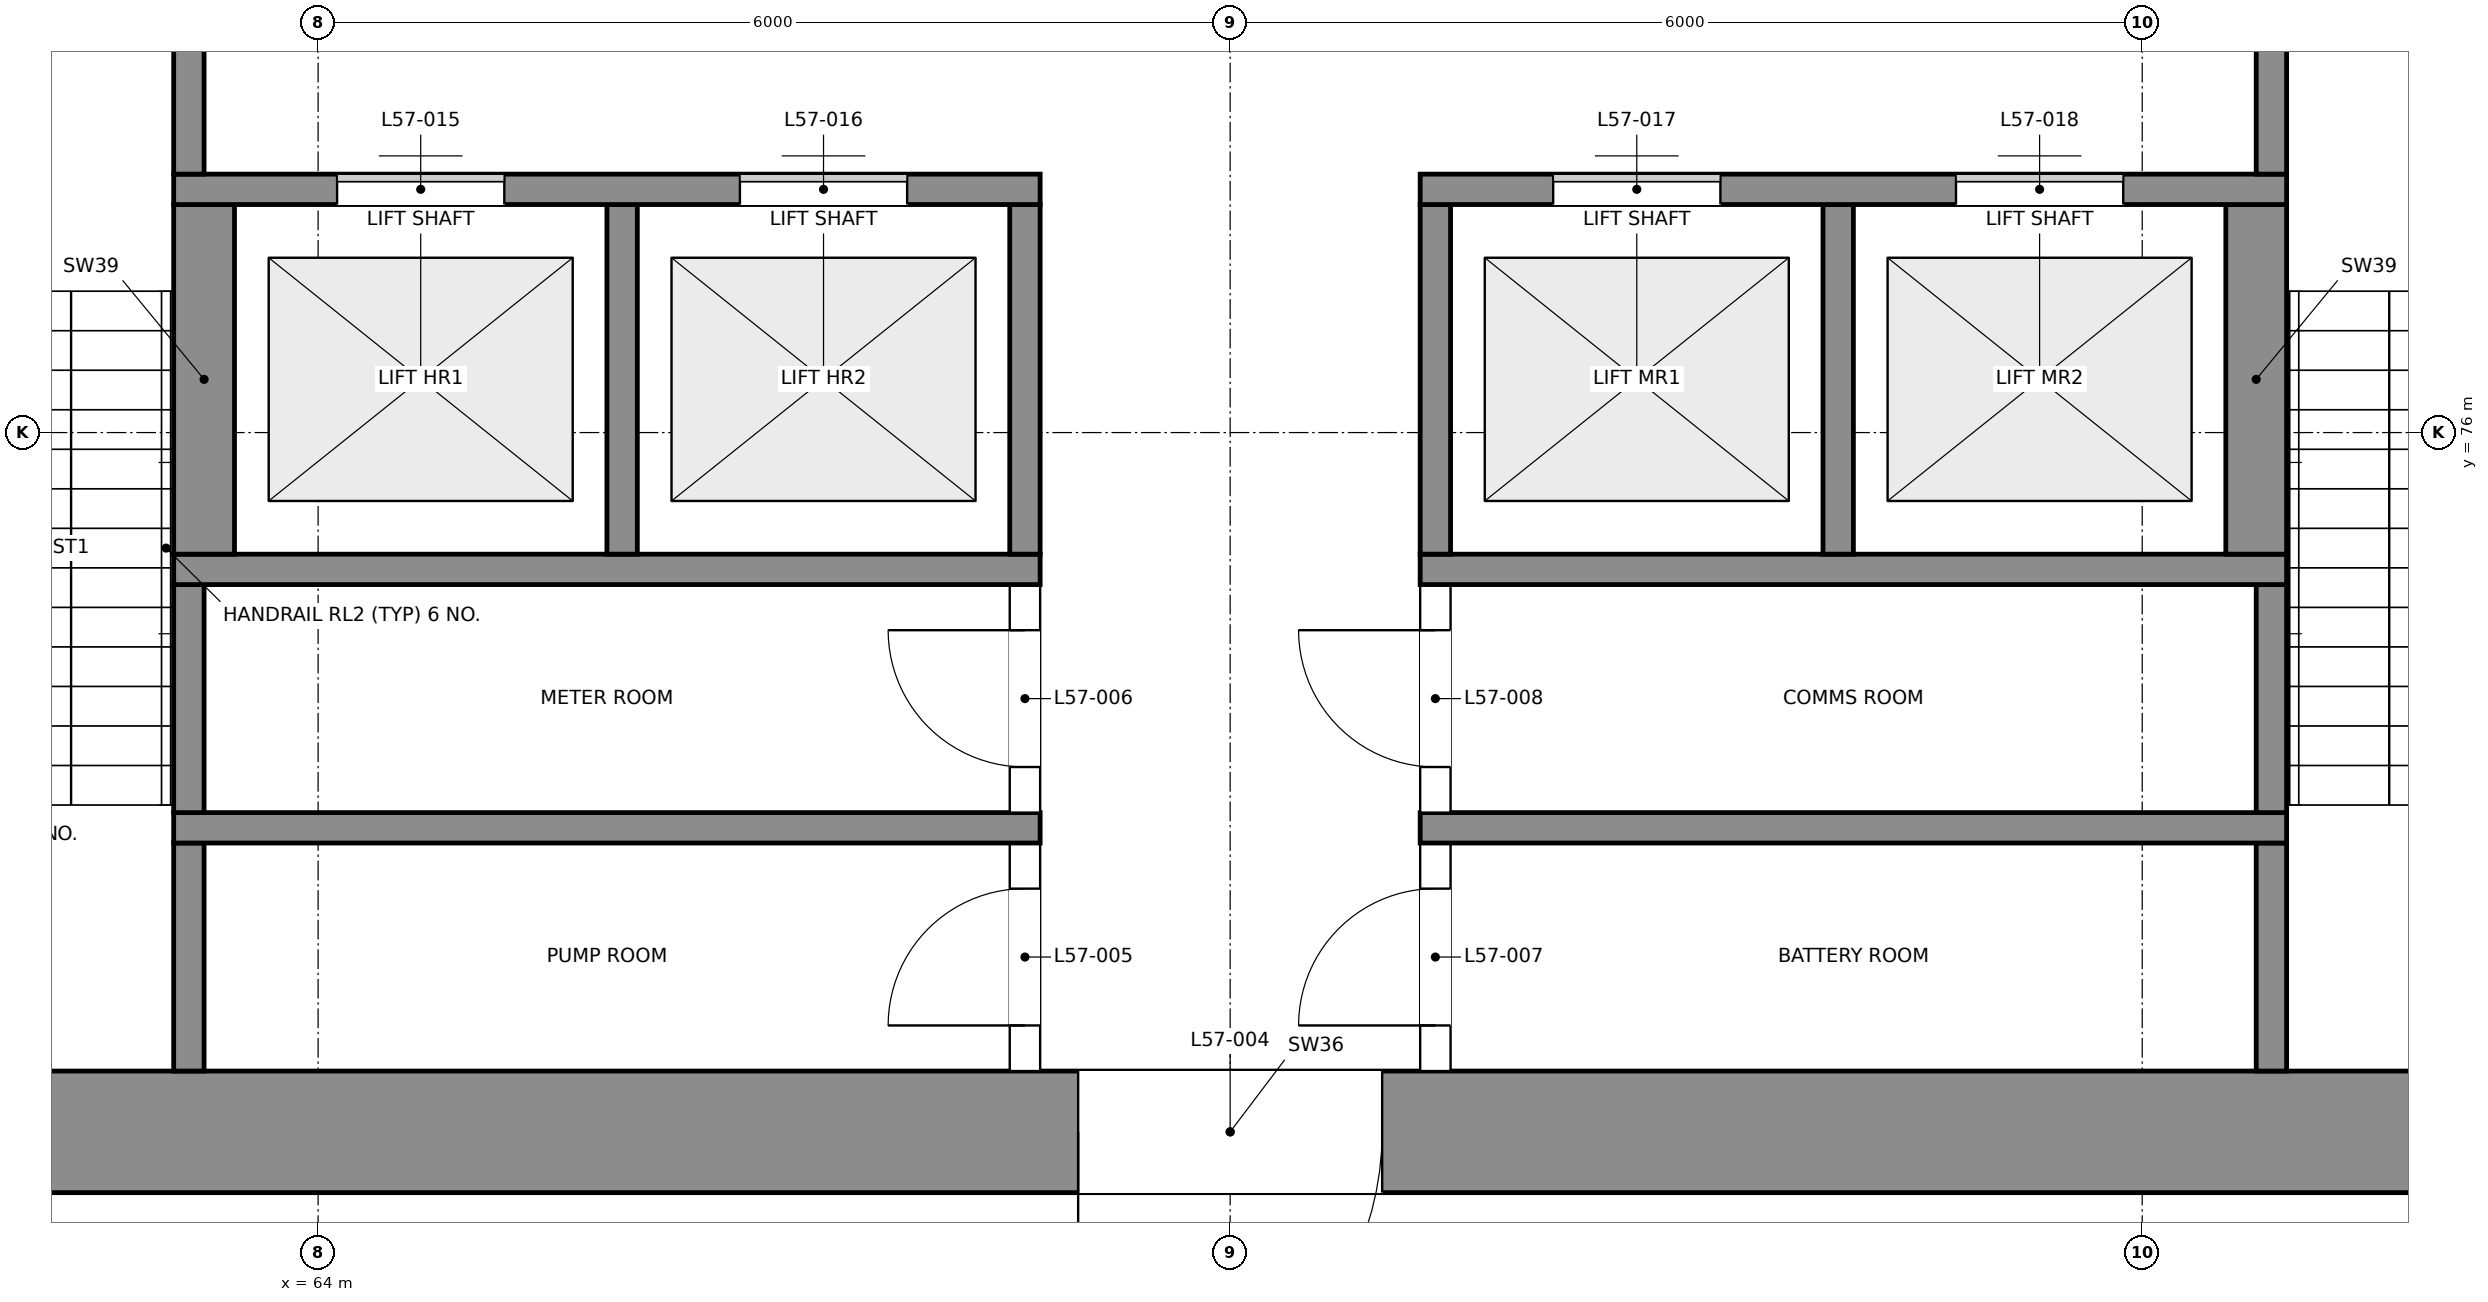
"""IFC4 building model, lengths in metres.
Left out: names, types, materials, properties, quantities, classifications, styles, units other than length and angle.
Written with IfcOpenShell. Run it as: python <this file> out.ifc"""

import sys

from ifc_helpers import new_model, si_unit, direction, frame, frame_2d, origin, place, context, subcontext, project, spatial, rectangle, extrude, element, fill, save


model = new_model("IFC4")
c1 = context("Model", 3, precision=1e-05, world=origin(), true_north=direction((0.0, 1.0)))
c2 = subcontext(c1, "Body", "Model", "MODEL_VIEW")
j1 = project(units=[si_unit("LENGTHUNIT", "METRE"), si_unit("PLANEANGLEUNIT", "RADIAN")], contexts=[c1])
p1 = place(None, origin())
s1 = spatial("IfcSite", under=j1, at=p1, CompositionType="ELEMENT")
p2 = place(p1, origin())
s2 = spatial("IfcBuilding", under=s1, at=p2, CompositionType="ELEMENT")
p3 = place(p2, frame((0.0, 0.0, 243.3)))
s3 = spatial("IfcBuildingStorey", under=s2, at=p3, CompositionType="ELEMENT", Elevation=243.3)
p4 = place(p3, frame((59.0, 71.4, 0.0), z_axis=(0.0, 0.0, 1.0), x_axis=(1.0, 0.0, 0.0)))
e1 = element("IfcWall", 1, at=p4, inside=s3, PredefinedType="SHEAR", context=c2, shape_type="SweptSolid", body=[
    extrude(rectangle(XDim=22.0, YDim=0.8, at=frame_2d((11.0, 0.0))), origin(), (0.0, 0.0, 1.0), 5.0),
])
p5 = place(p4, frame((2.025, 0.0, 0.0)))
e2 = element("IfcOpeningElement", 2, at=p5, cuts=e1, PredefinedType="OPENING", context=c2, shape_type="SweptSolid", body=[
    extrude(rectangle(XDim=1.2, YDim=2.1, at=frame_2d((0.6, 1.05))), frame((0.0, 0.41, 0.0), z_axis=(0.0, -1.0, 0.0), x_axis=(1.0, 0.0, 0.0)), (0.0, 0.0, 1.0), 0.82),
])
p6 = place(p4, frame((18.775, 0.0, 0.0)))
e3 = element("IfcOpeningElement", 3, at=p6, cuts=e1, PredefinedType="OPENING", context=c2, shape_type="SweptSolid", body=[
    extrude(rectangle(XDim=1.2, YDim=2.1, at=frame_2d((0.6, 1.05))), frame((0.0, 0.41, 0.0), z_axis=(0.0, -1.0, 0.0), x_axis=(1.0, 0.0, 0.0)), (0.0, 0.0, 1.0), 0.82),
])
p7 = place(p4, frame((10.0, 0.0, 0.0)))
e4 = element("IfcOpeningElement", 4, at=p7, cuts=e1, PredefinedType="OPENING", context=c2, shape_type="SweptSolid", body=[
    extrude(rectangle(XDim=2.0, YDim=2.1, at=frame_2d((1.0, 1.05))), frame((0.0, 0.41, 0.0), z_axis=(0.0, -1.0, 0.0), x_axis=(1.0, 0.0, 0.0)), (0.0, 0.0, 1.0), 0.82),
])
p8 = place(p3, frame((63.15, 71.8, 0.0), z_axis=(0.0, 0.0, 1.0), x_axis=(0.0, 1.0, 0.0)))
e5 = element("IfcWall", 5, at=p8, inside=s3, PredefinedType="SHEAR", context=c2, shape_type="SweptSolid", body=[
    extrude(rectangle(XDim=1.5, YDim=0.2, at=frame_2d((0.75, 0.0))), origin(), (0.0, 0.0, 1.0), 5.0),
])
p9 = place(p3, frame((68.65, 71.8, 0.0), z_axis=(0.0, 0.0, 1.0), x_axis=(0.0, 1.0, 0.0)))
e6 = element("IfcWall", 6, at=p9, inside=s3, PredefinedType="PARTITIONING", context=c2, shape_type="SweptSolid", body=[
    extrude(rectangle(XDim=1.5, YDim=0.2, at=frame_2d((0.75, 0.0))), origin(), (0.0, 0.0, 1.0), 4.7),
])
p10 = place(p9, frame((0.3, 0.0, 0.0)))
e7 = element("IfcOpeningElement", 7, at=p10, cuts=e6, PredefinedType="OPENING", context=c2, shape_type="SweptSolid", body=[
    extrude(rectangle(XDim=0.9, YDim=2.1, at=frame_2d((0.45, 1.05))), frame((0.0, 0.11, 0.0), z_axis=(0.0, -1.0, 0.0), x_axis=(1.0, 0.0, 0.0)), (0.0, 0.0, 1.0), 0.22),
])
p11 = place(p3, frame((71.35, 71.8, 0.0), z_axis=(0.0, 0.0, 1.0), x_axis=(0.0, 1.0, 0.0)))
e8 = element("IfcWall", 8, at=p11, inside=s3, PredefinedType="PARTITIONING", context=c2, shape_type="SweptSolid", body=[
    extrude(rectangle(XDim=1.5, YDim=0.2, at=frame_2d((0.75, 0.0))), origin(), (0.0, 0.0, 1.0), 4.7),
])
p12 = place(p11, frame((0.3, 0.0, 0.0)))
e9 = element("IfcOpeningElement", 9, at=p12, cuts=e8, PredefinedType="OPENING", context=c2, shape_type="SweptSolid", body=[
    extrude(rectangle(XDim=0.9, YDim=2.1, at=frame_2d((0.45, 1.05))), frame((0.0, 0.11, 0.0), z_axis=(0.0, -1.0, 0.0), x_axis=(1.0, 0.0, 0.0)), (0.0, 0.0, 1.0), 0.22),
])
p13 = place(p3, frame((76.85, 71.8, 0.0), z_axis=(0.0, 0.0, 1.0), x_axis=(0.0, 1.0, 0.0)))
e10 = element("IfcWall", 10, at=p13, inside=s3, PredefinedType="SHEAR", context=c2, shape_type="SweptSolid", body=[
    extrude(rectangle(XDim=1.5, YDim=0.2, at=frame_2d((0.75, 0.0))), origin(), (0.0, 0.0, 1.0), 5.0),
])
for number, where, z_axis, x_axis in (
    (11, (63.05, 73.4, 0.0), (0.0, 0.0, 1.0), (1.0, 0.0, 0.0)),
    (12, (71.25, 73.4, 0.0), (0.0, 0.0, 1.0), (1.0, 0.0, 0.0)),
):
    element("IfcWall", number, at=place(p3, frame(where, z_axis=z_axis, x_axis=x_axis)), inside=s3, PredefinedType="SHEAR", context=c2, shape_type="SweptSolid", body=[
        extrude(rectangle(XDim=5.7, YDim=0.2, at=frame_2d((2.85, 0.0))), origin(), (0.0, 0.0, 1.0), 5.0),
    ])
p14 = place(p3, frame((63.15, 73.5, 0.0), z_axis=(0.0, 0.0, 1.0), x_axis=(0.0, 1.0, 0.0)))
e13 = element("IfcWall", 13, at=p14, inside=s3, PredefinedType="SHEAR", context=c2, shape_type="SweptSolid", body=[
    extrude(rectangle(XDim=1.5, YDim=0.2, at=frame_2d((0.75, 0.0))), origin(), (0.0, 0.0, 1.0), 5.0),
])
p15 = place(p3, frame((68.65, 73.5, 0.0), z_axis=(0.0, 0.0, 1.0), x_axis=(0.0, 1.0, 0.0)))
e14 = element("IfcWall", 14, at=p15, inside=s3, PredefinedType="PARTITIONING", context=c2, shape_type="SweptSolid", body=[
    extrude(rectangle(XDim=1.5, YDim=0.2, at=frame_2d((0.75, 0.0))), origin(), (0.0, 0.0, 1.0), 4.7),
])
p16 = place(p15, frame((0.3, 0.0, 0.0)))
e15 = element("IfcOpeningElement", 15, at=p16, cuts=e14, PredefinedType="OPENING", context=c2, shape_type="SweptSolid", body=[
    extrude(rectangle(XDim=0.9, YDim=2.1, at=frame_2d((0.45, 1.05))), frame((0.0, 0.11, 0.0), z_axis=(0.0, -1.0, 0.0), x_axis=(1.0, 0.0, 0.0)), (0.0, 0.0, 1.0), 0.22),
])
p17 = place(p3, frame((71.35, 73.5, 0.0), z_axis=(0.0, 0.0, 1.0), x_axis=(0.0, 1.0, 0.0)))
e16 = element("IfcWall", 16, at=p17, inside=s3, PredefinedType="PARTITIONING", context=c2, shape_type="SweptSolid", body=[
    extrude(rectangle(XDim=1.5, YDim=0.2, at=frame_2d((0.75, 0.0))), origin(), (0.0, 0.0, 1.0), 4.7),
])
p18 = place(p17, frame((0.3, 0.0, 0.0)))
e17 = element("IfcOpeningElement", 17, at=p18, cuts=e16, PredefinedType="OPENING", context=c2, shape_type="SweptSolid", body=[
    extrude(rectangle(XDim=0.9, YDim=2.1, at=frame_2d((0.45, 1.05))), frame((0.0, 0.11, 0.0), z_axis=(0.0, -1.0, 0.0), x_axis=(1.0, 0.0, 0.0)), (0.0, 0.0, 1.0), 0.22),
])
p19 = place(p3, frame((76.85, 73.5, 0.0), z_axis=(0.0, 0.0, 1.0), x_axis=(0.0, 1.0, 0.0)))
e18 = element("IfcWall", 18, at=p19, inside=s3, PredefinedType="SHEAR", context=c2, shape_type="SweptSolid", body=[
    extrude(rectangle(XDim=1.5, YDim=0.2, at=frame_2d((0.75, 0.0))), origin(), (0.0, 0.0, 1.0), 5.0),
])
for number, where, z_axis, x_axis in (
    (19, (63.05, 75.1, 0.0), (0.0, 0.0, 1.0), (1.0, 0.0, 0.0)),
    (20, (71.25, 75.1, 0.0), (0.0, 0.0, 1.0), (1.0, 0.0, 0.0)),
):
    element("IfcWall", number, at=place(p3, frame(where, z_axis=z_axis, x_axis=x_axis)), inside=s3, PredefinedType="SHEAR", context=c2, shape_type="SweptSolid", body=[
        extrude(rectangle(XDim=5.7, YDim=0.2, at=frame_2d((2.85, 0.0))), origin(), (0.0, 0.0, 1.0), 5.0),
    ])
p20 = place(p3, frame((63.25, 75.2, 0.0), z_axis=(0.0, 0.0, 1.0), x_axis=(0.0, 1.0, 0.0)))
e21 = element("IfcWall", 21, at=p20, inside=s3, PredefinedType="SHEAR", context=c2, shape_type="SweptSolid", body=[
    extrude(rectangle(XDim=2.3, YDim=0.4, at=frame_2d((1.15, 0.0))), origin(), (0.0, 0.0, 1.0), 5.0),
])
for number, where, z_axis, x_axis in (
    (22, (66.0, 75.2, 0.0), (0.0, 0.0, 1.0), (0.0, 1.0, 0.0)),
    (23, (68.65, 75.2, 0.0), (0.0, 0.0, 1.0), (0.0, 1.0, 0.0)),
    (24, (71.35, 75.2, 0.0), (0.0, 0.0, 1.0), (0.0, 1.0, 0.0)),
    (25, (74.0, 75.2, 0.0), (0.0, 0.0, 1.0), (0.0, 1.0, 0.0)),
):
    element("IfcWall", number, at=place(p3, frame(where, z_axis=z_axis, x_axis=x_axis)), inside=s3, PredefinedType="SHEAR", context=c2, shape_type="SweptSolid", body=[
        extrude(rectangle(XDim=2.3, YDim=0.2, at=frame_2d((1.15, 0.0))), origin(), (0.0, 0.0, 1.0), 5.0),
    ])
p21 = place(p3, frame((76.75, 75.2, 0.0), z_axis=(0.0, 0.0, 1.0), x_axis=(0.0, 1.0, 0.0)))
e26 = element("IfcWall", 26, at=p21, inside=s3, PredefinedType="SHEAR", context=c2, shape_type="SweptSolid", body=[
    extrude(rectangle(XDim=2.3, YDim=0.4, at=frame_2d((1.15, 0.0))), origin(), (0.0, 0.0, 1.0), 5.0),
])
p22 = place(p3, frame((63.05, 77.6, 0.0), z_axis=(0.0, 0.0, 1.0), x_axis=(1.0, 0.0, 0.0)))
e27 = element("IfcWall", 27, at=p22, inside=s3, PredefinedType="SHEAR", context=c2, shape_type="SweptSolid", body=[
    extrude(rectangle(XDim=5.7, YDim=0.2, at=frame_2d((2.85, 0.0))), origin(), (0.0, 0.0, 1.0), 5.0),
])
p23 = place(p22, frame((1.075, 0.0, 0.0)))
e28 = element("IfcOpeningElement", 28, at=p23, cuts=e27, PredefinedType="OPENING", context=c2, shape_type="SweptSolid", body=[
    extrude(rectangle(XDim=1.1, YDim=2.1, at=frame_2d((0.55, 1.05))), frame((0.0, 0.11, 0.0), z_axis=(0.0, -1.0, 0.0), x_axis=(1.0, 0.0, 0.0)), (0.0, 0.0, 1.0), 0.22),
])
p24 = place(p22, frame((3.725, 0.0, 0.0)))
e29 = element("IfcOpeningElement", 29, at=p24, cuts=e27, PredefinedType="OPENING", context=c2, shape_type="SweptSolid", body=[
    extrude(rectangle(XDim=1.1, YDim=2.1, at=frame_2d((0.55, 1.05))), frame((0.0, 0.11, 0.0), z_axis=(0.0, -1.0, 0.0), x_axis=(1.0, 0.0, 0.0)), (0.0, 0.0, 1.0), 0.22),
])
p25 = place(p3, frame((71.25, 77.6, 0.0), z_axis=(0.0, 0.0, 1.0), x_axis=(1.0, 0.0, 0.0)))
e30 = element("IfcWall", 30, at=p25, inside=s3, PredefinedType="SHEAR", context=c2, shape_type="SweptSolid", body=[
    extrude(rectangle(XDim=5.7, YDim=0.2, at=frame_2d((2.85, 0.0))), origin(), (0.0, 0.0, 1.0), 5.0),
])
p26 = place(p25, frame((0.875, 0.0, 0.0)))
e31 = element("IfcOpeningElement", 31, at=p26, cuts=e30, PredefinedType="OPENING", context=c2, shape_type="SweptSolid", body=[
    extrude(rectangle(XDim=1.1, YDim=2.1, at=frame_2d((0.55, 1.05))), frame((0.0, 0.11, 0.0), z_axis=(0.0, -1.0, 0.0), x_axis=(1.0, 0.0, 0.0)), (0.0, 0.0, 1.0), 0.22),
])
p27 = place(p25, frame((3.525, 0.0, 0.0)))
e32 = element("IfcOpeningElement", 32, at=p27, cuts=e30, PredefinedType="OPENING", context=c2, shape_type="SweptSolid", body=[
    extrude(rectangle(XDim=1.1, YDim=2.1, at=frame_2d((0.55, 1.05))), frame((0.0, 0.11, 0.0), z_axis=(0.0, -1.0, 0.0), x_axis=(1.0, 0.0, 0.0)), (0.0, 0.0, 1.0), 0.22),
])
for number, where, z_axis, x_axis in (
    (33, (63.15, 77.7, 0.0), (0.0, 0.0, 1.0), (0.0, 1.0, 0.0)),
    (34, (76.85, 77.7, 0.0), (0.0, 0.0, 1.0), (0.0, 1.0, 0.0)),
):
    element("IfcWall", number, at=place(p3, frame(where, z_axis=z_axis, x_axis=x_axis)), inside=s3, PredefinedType="SHEAR", context=c2, shape_type="SweptSolid", body=[
        extrude(rectangle(XDim=3.2, YDim=0.2, at=frame_2d((1.6, 0.0))), origin(), (0.0, 0.0, 1.0), 5.0),
    ])
p28 = place(p7, frame((2.0, 0.0, 0.0), z_axis=(0.0, 0.0, 1.0), x_axis=(-1.0, 0.0, 0.0)))
e35 = element("IfcDoor", 35, at=p28, inside=s3, OperationType="DOUBLE_DOOR_SINGLE_SWING", PredefinedType="DOOR", context=c2, shape_type="SweptSolid", body=[
    extrude(rectangle(XDim=2.0, YDim=2.1, at=frame_2d((1.0, 1.05))), frame((0.0, 0.025, 0.0), z_axis=(0.0, -1.0, 0.0), x_axis=(1.0, 0.0, 0.0)), (0.0, 0.0, 1.0), 0.05),
])
fill(e4, e35)
p29 = place(p10, origin())
e36 = element("IfcDoor", 36, at=p29, inside=s3, OperationType="SINGLE_SWING_LEFT", PredefinedType="DOOR", context=c2, shape_type="SweptSolid", body=[
    extrude(rectangle(XDim=0.9, YDim=2.1, at=frame_2d((0.45, 1.05))), frame((0.0, 0.025, 0.0), z_axis=(0.0, -1.0, 0.0), x_axis=(1.0, 0.0, 0.0)), (0.0, 0.0, 1.0), 0.05),
])
fill(e7, e36)
p30 = place(p16, origin())
e37 = element("IfcDoor", 37, at=p30, inside=s3, OperationType="SINGLE_SWING_RIGHT", PredefinedType="DOOR", context=c2, shape_type="SweptSolid", body=[
    extrude(rectangle(XDim=0.9, YDim=2.1, at=frame_2d((0.45, 1.05))), frame((0.0, 0.025, 0.0), z_axis=(0.0, -1.0, 0.0), x_axis=(1.0, 0.0, 0.0)), (0.0, 0.0, 1.0), 0.05),
])
fill(e15, e37)
p31 = place(p12, origin())
e38 = element("IfcDoor", 38, at=p31, inside=s3, OperationType="SINGLE_SWING_LEFT", PredefinedType="DOOR", context=c2, shape_type="SweptSolid", body=[
    extrude(rectangle(XDim=0.9, YDim=2.1, at=frame_2d((0.45, 1.05))), frame((0.0, 0.025, 0.0), z_axis=(0.0, -1.0, 0.0), x_axis=(1.0, 0.0, 0.0)), (0.0, 0.0, 1.0), 0.05),
])
fill(e9, e38)
p32 = place(p18, origin())
e39 = element("IfcDoor", 39, at=p32, inside=s3, OperationType="SINGLE_SWING_RIGHT", PredefinedType="DOOR", context=c2, shape_type="SweptSolid", body=[
    extrude(rectangle(XDim=0.9, YDim=2.1, at=frame_2d((0.45, 1.05))), frame((0.0, 0.025, 0.0), z_axis=(0.0, -1.0, 0.0), x_axis=(1.0, 0.0, 0.0)), (0.0, 0.0, 1.0), 0.05),
])
fill(e17, e39)
p33 = place(p23, origin())
e40 = element("IfcDoor", 40, at=p33, inside=s3, OperationType="DOUBLE_DOOR_SLIDING", PredefinedType="DOOR", context=c2, shape_type="SweptSolid", body=[
    extrude(rectangle(XDim=1.1, YDim=2.1, at=frame_2d((0.55, 1.05))), frame((0.0, 0.025, 0.0), z_axis=(0.0, -1.0, 0.0), x_axis=(1.0, 0.0, 0.0)), (0.0, 0.0, 1.0), 0.05),
])
fill(e28, e40)
p34 = place(p24, origin())
e41 = element("IfcDoor", 41, at=p34, inside=s3, OperationType="DOUBLE_DOOR_SLIDING", PredefinedType="DOOR", context=c2, shape_type="SweptSolid", body=[
    extrude(rectangle(XDim=1.1, YDim=2.1, at=frame_2d((0.55, 1.05))), frame((0.0, 0.025, 0.0), z_axis=(0.0, -1.0, 0.0), x_axis=(1.0, 0.0, 0.0)), (0.0, 0.0, 1.0), 0.05),
])
fill(e29, e41)
p35 = place(p26, origin())
e42 = element("IfcDoor", 42, at=p35, inside=s3, OperationType="DOUBLE_DOOR_SLIDING", PredefinedType="DOOR", context=c2, shape_type="SweptSolid", body=[
    extrude(rectangle(XDim=1.1, YDim=2.1, at=frame_2d((0.55, 1.05))), frame((0.0, 0.025, 0.0), z_axis=(0.0, -1.0, 0.0), x_axis=(1.0, 0.0, 0.0)), (0.0, 0.0, 1.0), 0.05),
])
fill(e31, e42)
p36 = place(p27, origin())
e43 = element("IfcDoor", 43, at=p36, inside=s3, OperationType="DOUBLE_DOOR_SLIDING", PredefinedType="DOOR", context=c2, shape_type="SweptSolid", body=[
    extrude(rectangle(XDim=1.1, YDim=2.1, at=frame_2d((0.55, 1.05))), frame((0.0, 0.025, 0.0), z_axis=(0.0, -1.0, 0.0), x_axis=(1.0, 0.0, 0.0)), (0.0, 0.0, 1.0), 0.05),
])
fill(e32, e43)
save(model, sys.argv[1])
